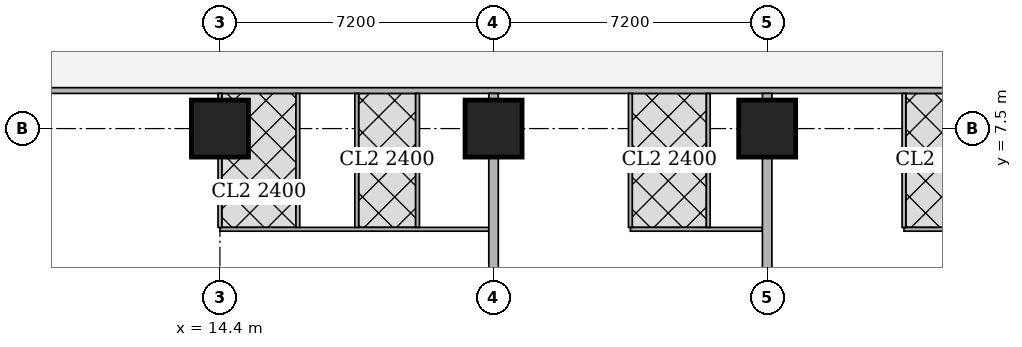
"""IFC4 building model, lengths in metres.
Left out: names, types, materials, properties, quantities, classifications, styles, units other than length and angle.
Written with IfcOpenShell. Run it as: python <this file> out.ifc"""

import sys

from ifc_helpers import new_model, si_unit, direction, frame, frame_2d, origin, origin_2d, place, context, subcontext, project, spatial, rectangle, extrude, element, fill, save


model = new_model("IFC4")
c1 = context("Model", 3, precision=1e-05, world=origin(), true_north=direction((0.0, 1.0)))
c2 = subcontext(c1, "Body", "Model", "MODEL_VIEW")
j1 = project(units=[si_unit("LENGTHUNIT", "METRE"), si_unit("PLANEANGLEUNIT", "RADIAN")], contexts=[c1])
p1 = place(None, origin())
s1 = spatial("IfcSite", under=j1, at=p1, CompositionType="ELEMENT")
p2 = place(p1, origin())
s2 = spatial("IfcBuilding", under=s1, at=p2, CompositionType="ELEMENT")
p3 = place(p2, frame((0.0, 0.0, 180.8)))
s3 = spatial("IfcBuildingStorey", under=s2, at=p3, CompositionType="ELEMENT", Elevation=180.8)
for number, where, z_axis, x_axis in (
    (1, (14.4, 7.5, 0.0), (0.0, 0.0, 1.0), (1.0, 0.0, 0.0)),
    (2, (21.6, 7.5, 0.0), (0.0, 0.0, 1.0), (1.0, 0.0, 0.0)),
    (3, (28.8, 7.5, 0.0), (0.0, 0.0, 1.0), (1.0, 0.0, 0.0)),
):
    element("IfcColumn", number, at=place(p3, frame(where, z_axis=z_axis, x_axis=x_axis)), inside=s3, PredefinedType="COLUMN", context=c2, shape_type="SweptSolid", body=[
        extrude(rectangle(XDim=1.5, YDim=1.5, at=origin_2d()), origin(), (0.0, 0.0, 1.0), 3.75),
    ])
p4 = place(p3, frame((40.053, 8.5, 0.0), z_axis=(0.0, 0.0, 1.0), x_axis=(-1.0, 0.0, 0.0)))
e4 = element("IfcWall", 4, at=p4, inside=s3, PredefinedType="SOLIDWALL", context=c2, shape_type="SweptSolid", body=[
    extrude(rectangle(XDim=31.703, YDim=0.15, at=frame_2d((15.852, 0.0))), origin(), (0.0, 0.0, 1.0), 3.5),
])
p5 = place(p4, frame((28.103, 0.0, 0.0)))
e5 = element("IfcOpeningElement", 5, at=p5, cuts=e4, PredefinedType="OPENING", context=c2, shape_type="SweptSolid", body=[
    extrude(rectangle(XDim=1.0, YDim=2.1, at=frame_2d((0.5, 1.05))), frame((0.0, 0.085, 0.0), z_axis=(0.0, -1.0, 0.0), x_axis=(1.0, 0.0, 0.0)), (0.0, 0.0, 1.0), 0.17),
])
p6 = place(p4, frame((15.953, 0.0, 0.0)))
e6 = element("IfcOpeningElement", 6, at=p6, cuts=e4, PredefinedType="OPENING", context=c2, shape_type="SweptSolid", body=[
    extrude(rectangle(XDim=1.0, YDim=2.1, at=frame_2d((0.5, 1.05))), frame((0.0, 0.085, 0.0), z_axis=(0.0, -1.0, 0.0), x_axis=(1.0, 0.0, 0.0)), (0.0, 0.0, 1.0), 0.17),
])
p7 = place(p4, frame((8.753, 0.0, 0.0)))
e7 = element("IfcOpeningElement", 7, at=p7, cuts=e4, PredefinedType="OPENING", context=c2, shape_type="SweptSolid", body=[
    extrude(rectangle(XDim=1.0, YDim=2.1, at=frame_2d((0.5, 1.05))), frame((0.0, 0.085, 0.0), z_axis=(0.0, -1.0, 0.0), x_axis=(1.0, 0.0, 0.0)), (0.0, 0.0, 1.0), 0.17),
])
p8 = place(p3, frame((21.475, 4.85, 0.0), z_axis=(0.0, 0.0, 1.0), x_axis=(-1.0, 0.0, 0.0)))
e8 = element("IfcWall", 8, at=p8, inside=s3, PredefinedType="PARTITIONING", context=c2, shape_type="SweptSolid", body=[
    extrude(rectangle(XDim=7.075, YDim=0.1, at=frame_2d((3.538, 0.0))), origin(), (0.0, 0.0, 1.0), 3.5),
])
p9 = place(p8, frame((5.6, 0.0, 0.0)))
e9 = element("IfcOpeningElement", 9, at=p9, cuts=e8, PredefinedType="OPENING", context=c2, shape_type="SweptSolid", body=[
    extrude(rectangle(XDim=0.9, YDim=2.1, at=frame_2d((0.45, 1.05))), frame((0.0, 0.06, 0.0), z_axis=(0.0, -1.0, 0.0), x_axis=(1.0, 0.0, 0.0)), (0.0, 0.0, 1.0), 0.12),
])
p10 = place(p8, frame((2.225, 0.0, 0.0)))
e10 = element("IfcOpeningElement", 10, at=p10, cuts=e8, PredefinedType="OPENING", context=c2, shape_type="SweptSolid", body=[
    extrude(rectangle(XDim=0.9, YDim=2.1, at=frame_2d((0.45, 1.05))), frame((0.0, 0.06, 0.0), z_axis=(0.0, -1.0, 0.0), x_axis=(1.0, 0.0, 0.0)), (0.0, 0.0, 1.0), 0.12),
])
p11 = place(p8, frame((3.8, 0.0, 0.0)))
e11 = element("IfcOpeningElement", 11, at=p11, cuts=e8, PredefinedType="OPENING", context=c2, shape_type="SweptSolid", body=[
    extrude(rectangle(XDim=0.9, YDim=2.1, at=frame_2d((0.45, 1.05))), frame((0.0, 0.06, 0.0), z_axis=(0.0, -1.0, 0.0), x_axis=(1.0, 0.0, 0.0)), (0.0, 0.0, 1.0), 0.12),
])
p12 = place(p8, frame((0.425, 0.0, 0.0)))
e12 = element("IfcOpeningElement", 12, at=p12, cuts=e8, PredefinedType="OPENING", context=c2, shape_type="SweptSolid", body=[
    extrude(rectangle(XDim=0.9, YDim=2.1, at=frame_2d((0.45, 1.05))), frame((0.0, 0.06, 0.0), z_axis=(0.0, -1.0, 0.0), x_axis=(1.0, 0.0, 0.0)), (0.0, 0.0, 1.0), 0.12),
])
p13 = place(p3, frame((14.4, 4.9, 0.0), z_axis=(0.0, 0.0, 1.0), x_axis=(0.0, 1.0, 0.0)))
e13 = element("IfcWall", 13, at=p13, inside=s3, PredefinedType="PARTITIONING", context=c2, shape_type="SweptSolid", body=[
    extrude(rectangle(XDim=1.849, YDim=0.1, at=frame_2d((0.925, 0.0))), origin(), (0.0, 0.0, 1.0), 3.5),
])
p14 = place(p3, frame((14.4, 8.251, 0.0), z_axis=(0.0, 0.0, 1.0), x_axis=(0.0, 1.0, 0.0)))
e14 = element("IfcWall", 14, at=p14, inside=s3, PredefinedType="PARTITIONING", context=c2, shape_type="SweptSolid", body=[
    extrude(rectangle(XDim=0.174, YDim=0.1, at=frame_2d((0.087, 0.0))), origin(), (0.0, 0.0, 1.0), 3.5),
])
for number, where, z_axis, x_axis in (
    (15, (18.0, 4.9, 0.0), (0.0, 0.0, 1.0), (0.0, 1.0, 0.0)),
    (16, (16.45, 4.9, 0.0), (0.0, 0.0, 1.0), (0.0, 1.0, 0.0)),
    (17, (19.6, 4.9, 0.0), (0.0, 0.0, 1.0), (0.0, 1.0, 0.0)),
):
    element("IfcWall", number, at=place(p3, frame(where, z_axis=z_axis, x_axis=x_axis)), inside=s3, PredefinedType="PARTITIONING", context=c2, shape_type="SweptSolid", body=[
        extrude(rectangle(XDim=3.525, YDim=0.1, at=frame_2d((1.763, 0.0))), origin(), (0.0, 0.0, 1.0), 3.5),
    ])
p15 = place(p3, frame((28.675, 4.85, 0.0), z_axis=(0.0, 0.0, 1.0), x_axis=(-1.0, 0.0, 0.0)))
e18 = element("IfcWall", 18, at=p15, inside=s3, PredefinedType="PARTITIONING", context=c2, shape_type="SweptSolid", body=[
    extrude(rectangle(XDim=3.475, YDim=0.1, at=frame_2d((1.738, 0.0))), origin(), (0.0, 0.0, 1.0), 3.5),
])
p16 = place(p15, frame((2.0, 0.0, 0.0)))
e19 = element("IfcOpeningElement", 19, at=p16, cuts=e18, PredefinedType="OPENING", context=c2, shape_type="SweptSolid", body=[
    extrude(rectangle(XDim=0.9, YDim=2.1, at=frame_2d((0.45, 1.05))), frame((0.0, 0.06, 0.0), z_axis=(0.0, -1.0, 0.0), x_axis=(1.0, 0.0, 0.0)), (0.0, 0.0, 1.0), 0.12),
])
p17 = place(p15, frame((0.2, 0.0, 0.0)))
e20 = element("IfcOpeningElement", 20, at=p17, cuts=e18, PredefinedType="OPENING", context=c2, shape_type="SweptSolid", body=[
    extrude(rectangle(XDim=0.9, YDim=2.1, at=frame_2d((0.45, 1.05))), frame((0.0, 0.06, 0.0), z_axis=(0.0, -1.0, 0.0), x_axis=(1.0, 0.0, 0.0)), (0.0, 0.0, 1.0), 0.12),
])
for number, where, z_axis, x_axis in (
    (21, (25.2, 4.9, 0.0), (0.0, 0.0, 1.0), (0.0, 1.0, 0.0)),
    (22, (27.25, 4.9, 0.0), (0.0, 0.0, 1.0), (0.0, 1.0, 0.0)),
):
    element("IfcWall", number, at=place(p3, frame(where, z_axis=z_axis, x_axis=x_axis)), inside=s3, PredefinedType="PARTITIONING", context=c2, shape_type="SweptSolid", body=[
        extrude(rectangle(XDim=3.525, YDim=0.1, at=frame_2d((1.763, 0.0))), origin(), (0.0, 0.0, 1.0), 3.5),
    ])
p18 = place(p3, frame((21.6, 3.65, 0.0), z_axis=(0.0, 0.0, 1.0), x_axis=(0.0, 1.0, 0.0)))
e23 = element("IfcWall", 23, at=p18, inside=s3, PredefinedType="SOLIDWALL", context=c2, shape_type="SweptSolid", body=[
    extrude(rectangle(XDim=3.099, YDim=0.25, at=frame_2d((1.55, 0.0))), origin(), (0.0, 0.0, 1.0), 3.5),
])
p19 = place(p3, frame((21.6, 8.251, 0.0), z_axis=(0.0, 0.0, 1.0), x_axis=(0.0, 1.0, 0.0)))
e24 = element("IfcWall", 24, at=p19, inside=s3, PredefinedType="SOLIDWALL", context=c2, shape_type="SweptSolid", body=[
    extrude(rectangle(XDim=0.174, YDim=0.25, at=frame_2d((0.087, 0.0))), origin(), (0.0, 0.0, 1.0), 3.5),
])
p20 = place(p3, frame((40.747, 4.85, 0.0), z_axis=(0.0, 0.0, 1.0), x_axis=(-1.0, 0.0, 0.0)))
e25 = element("IfcWall", 25, at=p20, inside=s3, PredefinedType="PARTITIONING", context=c2, shape_type="SweptSolid", body=[
    extrude(rectangle(XDim=8.347, YDim=0.1, at=frame_2d((4.174, 0.0))), origin(), (0.0, 0.0, 1.0), 3.5),
])
p21 = place(p20, frame((6.872, 0.0, 0.0)))
e26 = element("IfcOpeningElement", 26, at=p21, cuts=e25, PredefinedType="OPENING", context=c2, shape_type="SweptSolid", body=[
    extrude(rectangle(XDim=0.9, YDim=2.1, at=frame_2d((0.45, 1.05))), frame((0.0, 0.06, 0.0), z_axis=(0.0, -1.0, 0.0), x_axis=(1.0, 0.0, 0.0)), (0.0, 0.0, 1.0), 0.12),
])
p22 = place(p20, frame((3.497, 0.0, 0.0)))
e27 = element("IfcOpeningElement", 27, at=p22, cuts=e25, PredefinedType="OPENING", context=c2, shape_type="SweptSolid", body=[
    extrude(rectangle(XDim=0.9, YDim=2.1, at=frame_2d((0.45, 1.05))), frame((0.0, 0.06, 0.0), z_axis=(0.0, -1.0, 0.0), x_axis=(1.0, 0.0, 0.0)), (0.0, 0.0, 1.0), 0.12),
])
p23 = place(p20, frame((0.15, 0.0, 0.0)))
e28 = element("IfcOpeningElement", 28, at=p23, cuts=e25, PredefinedType="OPENING", context=c2, shape_type="SweptSolid", body=[
    extrude(rectangle(XDim=0.9, YDim=2.1, at=frame_2d((0.45, 1.05))), frame((0.0, 0.06, 0.0), z_axis=(0.0, -1.0, 0.0), x_axis=(1.0, 0.0, 0.0)), (0.0, 0.0, 1.0), 0.12),
])
p24 = place(p20, frame((5.072, 0.0, 0.0)))
e29 = element("IfcOpeningElement", 29, at=p24, cuts=e25, PredefinedType="OPENING", context=c2, shape_type="SweptSolid", body=[
    extrude(rectangle(XDim=0.9, YDim=2.1, at=frame_2d((0.45, 1.05))), frame((0.0, 0.06, 0.0), z_axis=(0.0, -1.0, 0.0), x_axis=(1.0, 0.0, 0.0)), (0.0, 0.0, 1.0), 0.12),
])
p25 = place(p20, frame((1.697, 0.0, 0.0)))
e30 = element("IfcOpeningElement", 30, at=p25, cuts=e25, PredefinedType="OPENING", context=c2, shape_type="SweptSolid", body=[
    extrude(rectangle(XDim=0.9, YDim=2.1, at=frame_2d((0.45, 1.05))), frame((0.0, 0.06, 0.0), z_axis=(0.0, -1.0, 0.0), x_axis=(1.0, 0.0, 0.0)), (0.0, 0.0, 1.0), 0.12),
])
p26 = place(p3, frame((32.4, 4.9, 0.0), z_axis=(0.0, 0.0, 1.0), x_axis=(0.0, 1.0, 0.0)))
e31 = element("IfcWall", 31, at=p26, inside=s3, PredefinedType="PARTITIONING", context=c2, shape_type="SweptSolid", body=[
    extrude(rectangle(XDim=3.525, YDim=0.1, at=frame_2d((1.763, 0.0))), origin(), (0.0, 0.0, 1.0), 3.5),
])
p27 = place(p3, frame((28.8, 3.65, 0.0), z_axis=(0.0, 0.0, 1.0), x_axis=(0.0, 1.0, 0.0)))
e32 = element("IfcWall", 32, at=p27, inside=s3, PredefinedType="SOLIDWALL", context=c2, shape_type="SweptSolid", body=[
    extrude(rectangle(XDim=3.099, YDim=0.25, at=frame_2d((1.55, 0.0))), origin(), (0.0, 0.0, 1.0), 3.5),
])
p28 = place(p3, frame((28.8, 8.251, 0.0), z_axis=(0.0, 0.0, 1.0), x_axis=(0.0, 1.0, 0.0)))
e33 = element("IfcWall", 33, at=p28, inside=s3, PredefinedType="SOLIDWALL", context=c2, shape_type="SweptSolid", body=[
    extrude(rectangle(XDim=0.174, YDim=0.25, at=frame_2d((0.087, 0.0))), origin(), (0.0, 0.0, 1.0), 3.5),
])
p29 = place(p9, origin())
e34 = element("IfcDoor", 34, at=p29, inside=s3, OperationType="SINGLE_SWING_LEFT", PredefinedType="DOOR", context=c2, shape_type="SweptSolid", body=[
    extrude(rectangle(XDim=0.9, YDim=2.1, at=frame_2d((0.45, 1.05))), frame((0.0, 0.025, 0.0), z_axis=(0.0, -1.0, 0.0), x_axis=(1.0, 0.0, 0.0)), (0.0, 0.0, 1.0), 0.05),
])
fill(e9, e34)
p30 = place(p10, origin())
e35 = element("IfcDoor", 35, at=p30, inside=s3, OperationType="SINGLE_SWING_RIGHT", PredefinedType="DOOR", context=c2, shape_type="SweptSolid", body=[
    extrude(rectangle(XDim=0.9, YDim=2.1, at=frame_2d((0.45, 1.05))), frame((0.0, 0.025, 0.0), z_axis=(0.0, -1.0, 0.0), x_axis=(1.0, 0.0, 0.0)), (0.0, 0.0, 1.0), 0.05),
])
fill(e10, e35)
p31 = place(p11, origin())
e36 = element("IfcDoor", 36, at=p31, inside=s3, OperationType="SINGLE_SWING_RIGHT", PredefinedType="DOOR", context=c2, shape_type="SweptSolid", body=[
    extrude(rectangle(XDim=0.9, YDim=2.1, at=frame_2d((0.45, 1.05))), frame((0.0, 0.025, 0.0), z_axis=(0.0, -1.0, 0.0), x_axis=(1.0, 0.0, 0.0)), (0.0, 0.0, 1.0), 0.05),
])
fill(e11, e36)
p32 = place(p12, origin())
e37 = element("IfcDoor", 37, at=p32, inside=s3, OperationType="SINGLE_SWING_RIGHT", PredefinedType="DOOR", context=c2, shape_type="SweptSolid", body=[
    extrude(rectangle(XDim=0.9, YDim=2.1, at=frame_2d((0.45, 1.05))), frame((0.0, 0.025, 0.0), z_axis=(0.0, -1.0, 0.0), x_axis=(1.0, 0.0, 0.0)), (0.0, 0.0, 1.0), 0.05),
])
fill(e12, e37)
p33 = place(p5, origin())
e38 = element("IfcDoor", 38, at=p33, inside=s3, OperationType="SINGLE_SWING_RIGHT", PredefinedType="DOOR", context=c2, shape_type="SweptSolid", body=[
    extrude(rectangle(XDim=1.0, YDim=2.1, at=frame_2d((0.5, 1.05))), frame((0.0, 0.025, 0.0), z_axis=(0.0, -1.0, 0.0), x_axis=(1.0, 0.0, 0.0)), (0.0, 0.0, 1.0), 0.05),
])
fill(e5, e38)
p34 = place(p16, origin())
e39 = element("IfcDoor", 39, at=p34, inside=s3, OperationType="SINGLE_SWING_LEFT", PredefinedType="DOOR", context=c2, shape_type="SweptSolid", body=[
    extrude(rectangle(XDim=0.9, YDim=2.1, at=frame_2d((0.45, 1.05))), frame((0.0, 0.025, 0.0), z_axis=(0.0, -1.0, 0.0), x_axis=(1.0, 0.0, 0.0)), (0.0, 0.0, 1.0), 0.05),
])
fill(e19, e39)
p35 = place(p17, origin())
e40 = element("IfcDoor", 40, at=p35, inside=s3, OperationType="SINGLE_SWING_RIGHT", PredefinedType="DOOR", context=c2, shape_type="SweptSolid", body=[
    extrude(rectangle(XDim=0.9, YDim=2.1, at=frame_2d((0.45, 1.05))), frame((0.0, 0.025, 0.0), z_axis=(0.0, -1.0, 0.0), x_axis=(1.0, 0.0, 0.0)), (0.0, 0.0, 1.0), 0.05),
])
fill(e20, e40)
p36 = place(p6, origin())
e41 = element("IfcDoor", 41, at=p36, inside=s3, OperationType="SINGLE_SWING_LEFT", PredefinedType="DOOR", context=c2, shape_type="SweptSolid", body=[
    extrude(rectangle(XDim=1.0, YDim=2.1, at=frame_2d((0.5, 1.05))), frame((0.0, 0.025, 0.0), z_axis=(0.0, -1.0, 0.0), x_axis=(1.0, 0.0, 0.0)), (0.0, 0.0, 1.0), 0.05),
])
fill(e6, e41)
p37 = place(p21, origin())
e42 = element("IfcDoor", 42, at=p37, inside=s3, OperationType="SINGLE_SWING_LEFT", PredefinedType="DOOR", context=c2, shape_type="SweptSolid", body=[
    extrude(rectangle(XDim=0.9, YDim=2.1, at=frame_2d((0.45, 1.05))), frame((0.0, 0.025, 0.0), z_axis=(0.0, -1.0, 0.0), x_axis=(1.0, 0.0, 0.0)), (0.0, 0.0, 1.0), 0.05),
])
fill(e26, e42)
p38 = place(p7, origin())
e43 = element("IfcDoor", 43, at=p38, inside=s3, OperationType="SINGLE_SWING_LEFT", PredefinedType="DOOR", context=c2, shape_type="SweptSolid", body=[
    extrude(rectangle(XDim=1.0, YDim=2.1, at=frame_2d((0.5, 1.05))), frame((0.0, 0.025, 0.0), z_axis=(0.0, -1.0, 0.0), x_axis=(1.0, 0.0, 0.0)), (0.0, 0.0, 1.0), 0.05),
])
fill(e7, e43)
save(model, sys.argv[1])
